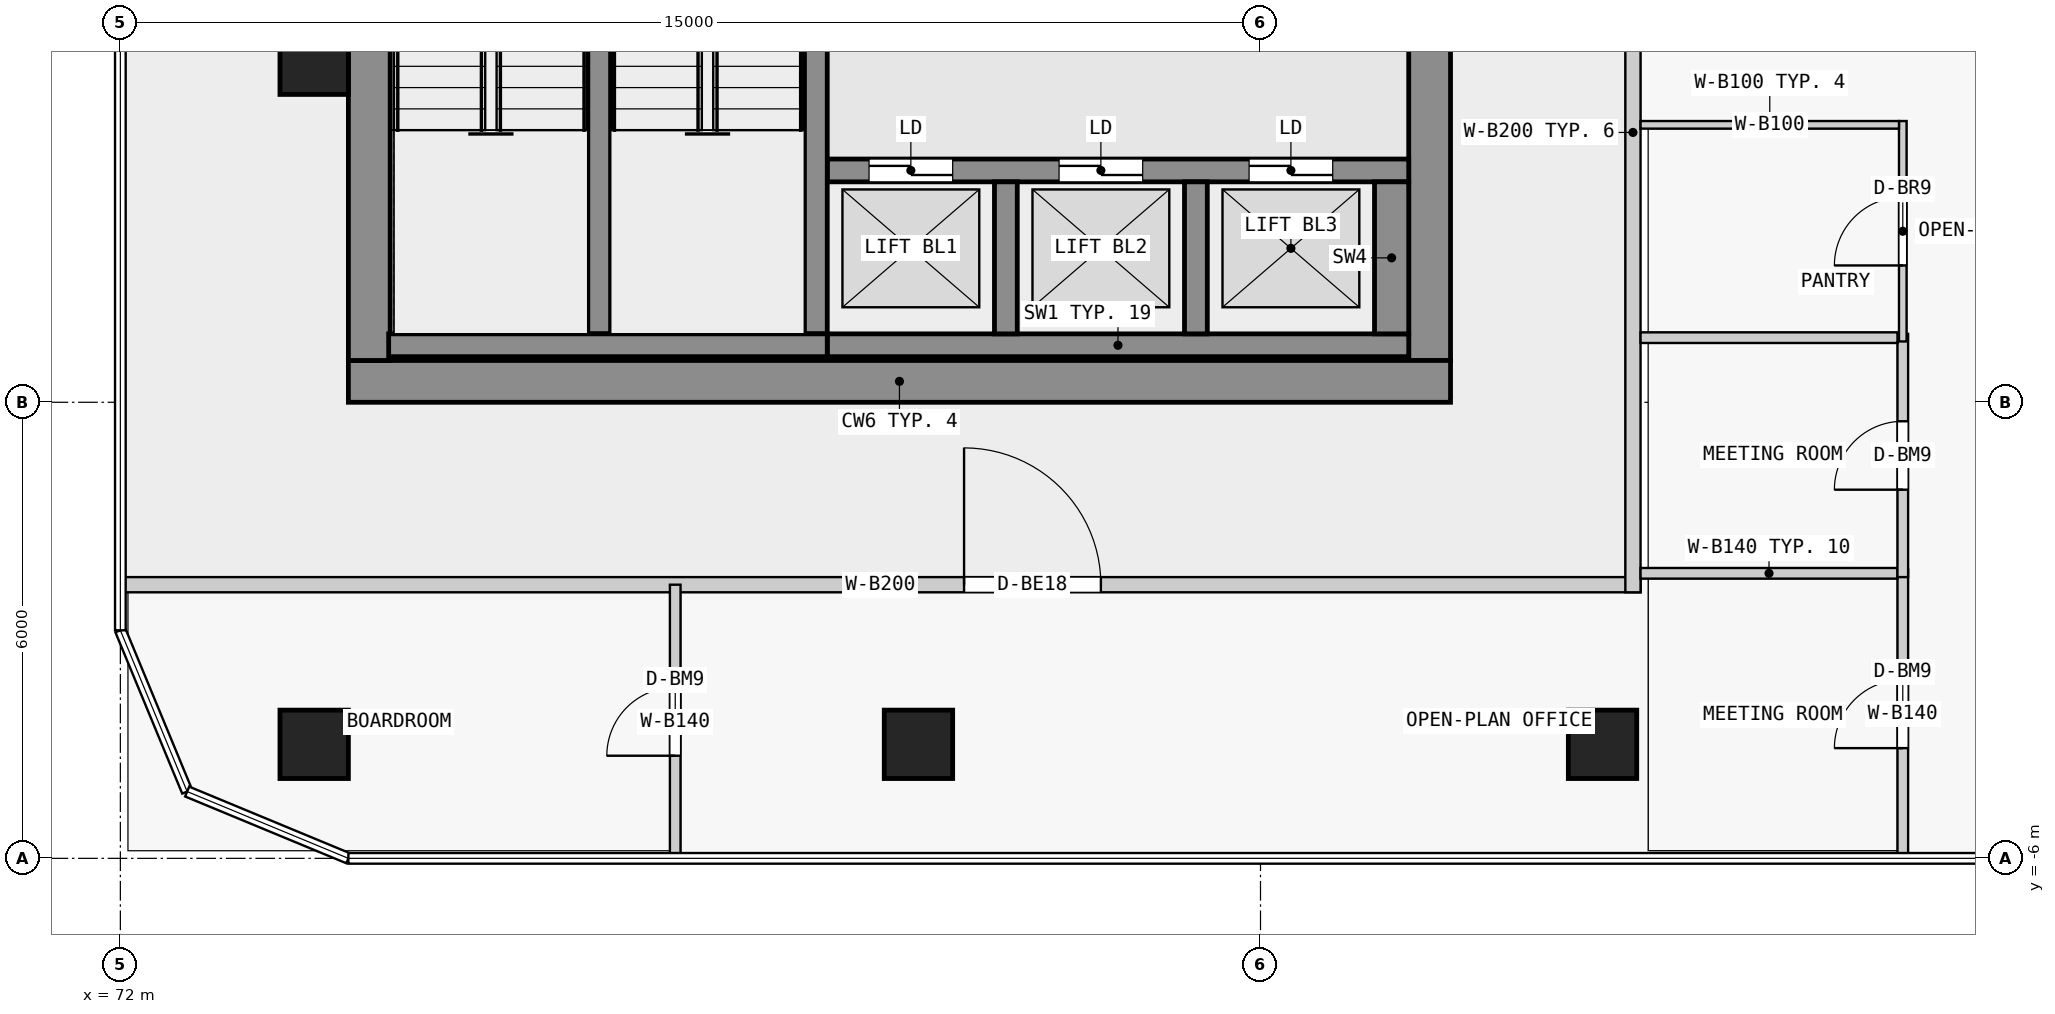
"""IFC4 building model, lengths in metres.
Left out: names, types, materials, properties, quantities, classifications, styles, units other than length and angle.
Written with IfcOpenShell. Run it as: python <this file> out.ifc"""

import sys

from ifc_helpers import new_model, si_unit, direction, frame, frame_2d, origin, origin_2d, place, context, subcontext, project, spatial, rectangle, extrude, element, fill, save


model = new_model("IFC4")
c1 = context("Model", 3, precision=1e-05, world=origin(), true_north=direction((0.0, 1.0)))
c2 = subcontext(c1, "Body", "Model", "MODEL_VIEW")
j1 = project(units=[si_unit("LENGTHUNIT", "METRE"), si_unit("PLANEANGLEUNIT", "RADIAN")], contexts=[c1])
p1 = place(None, origin())
s1 = spatial("IfcSite", under=j1, at=p1, CompositionType="ELEMENT")
p2 = place(p1, origin())
s2 = spatial("IfcBuilding", under=s1, at=p2, CompositionType="ELEMENT")
p3 = place(p2, frame((0.0, 0.0, 33.8)))
s3 = spatial("IfcBuildingStorey", under=s2, at=p3, CompositionType="ELEMENT", Elevation=33.8)
for number, where, z_axis, x_axis in (
    (1, (74.55, -4.5, 0.0), (0.0, 0.0, 1.0), (1.0, 0.0, 0.0)),
    (2, (82.5, -4.5, 0.0), (0.0, 0.0, 1.0), (1.0, 0.0, 0.0)),
    (3, (91.5, -4.5, 0.0), (0.0, 0.0, 1.0), (1.0, 0.0, 0.0)),
    (4, (74.55, 4.5, 0.0), (0.0, 0.0, 1.0), (1.0, 0.0, 0.0)),
):
    element("IfcColumn", number, at=place(p3, frame(where, z_axis=z_axis, x_axis=x_axis)), inside=s3, PredefinedType="COLUMN", context=c2, shape_type="SweptSolid", body=[
        extrude(rectangle(XDim=0.9, YDim=0.9, at=origin_2d()), origin(), (0.0, 0.0, 1.0), 3.5),
    ])
p4 = place(p3, frame((75.0, 0.275, 0.0), z_axis=(0.0, 0.0, 1.0), x_axis=(1.0, 0.0, 0.0)))
e5 = element("IfcWall", 5, at=p4, inside=s3, PredefinedType="SHEAR", context=c2, shape_type="SweptSolid", body=[
    extrude(rectangle(XDim=14.5, YDim=0.55, at=frame_2d((7.25, 0.0))), origin(), (0.0, 0.0, 1.0), 3.25),
])
p5 = place(p3, frame((75.275, 0.55, 0.0), z_axis=(0.0, 0.0, 1.0), x_axis=(0.0, 1.0, 0.0)))
e6 = element("IfcWall", 6, at=p5, inside=s3, PredefinedType="SHEAR", context=c2, shape_type="SweptSolid", body=[
    extrude(rectangle(XDim=16.9, YDim=0.55, at=frame_2d((8.45, 0.0))), origin(), (0.0, 0.0, 1.0), 3.25),
])
p6 = place(p5, frame((7.825, 0.0, 0.0)))
e7 = element("IfcOpeningElement", 7, at=p6, cuts=e6, PredefinedType="OPENING", context=c2, shape_type="SweptSolid", body=[
    extrude(rectangle(XDim=1.8, YDim=2.1, at=frame_2d((0.9, 1.05))), frame((0.0, 0.285, 0.0), z_axis=(0.0, -1.0, 0.0), x_axis=(1.0, 0.0, 0.0)), (0.0, 0.0, 1.0), 0.57),
])
p7 = place(p3, frame((89.225, 0.55, 0.0), z_axis=(0.0, 0.0, 1.0), x_axis=(0.0, 1.0, 0.0)))
e8 = element("IfcWall", 8, at=p7, inside=s3, PredefinedType="SHEAR", context=c2, shape_type="SweptSolid", body=[
    extrude(rectangle(XDim=16.9, YDim=0.55, at=frame_2d((8.45, 0.0))), origin(), (0.0, 0.0, 1.0), 3.25),
])
p8 = place(p7, frame((7.55, 0.0, 0.0)))
e9 = element("IfcOpeningElement", 9, at=p8, cuts=e8, PredefinedType="OPENING", context=c2, shape_type="SweptSolid", body=[
    extrude(rectangle(XDim=1.8, YDim=2.1, at=frame_2d((0.9, 1.05))), frame((0.0, 0.285, 0.0), z_axis=(0.0, -1.0, 0.0), x_axis=(1.0, 0.0, 0.0)), (0.0, 0.0, 1.0), 0.57),
])
p9 = place(p3, frame((75.53, 0.75, 0.0), z_axis=(0.0, 0.0, 1.0), x_axis=(1.0, 0.0, 0.0)))
e10 = element("IfcWall", 10, at=p9, inside=s3, PredefinedType="SHEAR", context=c2, shape_type="SweptSolid", body=[
    extrude(rectangle(XDim=5.77, YDim=0.3, at=frame_2d((2.885, 0.0))), origin(), (0.0, 0.0, 1.0), 3.25),
])
for number, where, z_axis, x_axis in (
    (11, (78.3, 0.9, 0.0), (0.0, 0.0, 1.0), (0.0, 1.0, 0.0)),
    (12, (81.15, 0.9, 0.0), (0.0, 0.0, 1.0), (0.0, 1.0, 0.0)),
):
    element("IfcWall", number, at=place(p3, frame(where, z_axis=z_axis, x_axis=x_axis)), inside=s3, PredefinedType="SHEAR", context=c2, shape_type="SweptSolid", body=[
        extrude(rectangle(XDim=6.4, YDim=0.3, at=frame_2d((3.2, 0.0))), origin(), (0.0, 0.0, 1.0), 3.25),
    ])
p10 = place(p3, frame((81.3, 0.75, 0.0), z_axis=(0.0, 0.0, 1.0), x_axis=(1.0, 0.0, 0.0)))
e13 = element("IfcWall", 13, at=p10, inside=s3, PredefinedType="SHEAR", context=c2, shape_type="SweptSolid", body=[
    extrude(rectangle(XDim=7.65, YDim=0.3, at=frame_2d((3.825, 0.0))), origin(), (0.0, 0.0, 1.0), 3.25),
])
for number, where, z_axis, x_axis in (
    (14, (83.65, 0.9, 0.0), (0.0, 0.0, 1.0), (0.0, 1.0, 0.0)),
    (15, (86.15, 0.9, 0.0), (0.0, 0.0, 1.0), (0.0, 1.0, 0.0)),
):
    element("IfcWall", number, at=place(p3, frame(where, z_axis=z_axis, x_axis=x_axis)), inside=s3, PredefinedType="SHEAR", context=c2, shape_type="SweptSolid", body=[
        extrude(rectangle(XDim=2.0, YDim=0.3, at=frame_2d((1.0, 0.0))), origin(), (0.0, 0.0, 1.0), 3.25),
    ])
p11 = place(p3, frame((88.725, 0.9, 0.0), z_axis=(0.0, 0.0, 1.0), x_axis=(0.0, 1.0, 0.0)))
e16 = element("IfcWall", 16, at=p11, inside=s3, PredefinedType="SHEAR", context=c2, shape_type="SweptSolid", body=[
    extrude(rectangle(XDim=2.0, YDim=0.45, at=frame_2d((1.0, 0.0))), origin(), (0.0, 0.0, 1.0), 3.25),
])
p12 = place(p3, frame((81.3, 3.05, 0.0), z_axis=(0.0, 0.0, 1.0), x_axis=(1.0, 0.0, 0.0)))
e17 = element("IfcWall", 17, at=p12, inside=s3, PredefinedType="SHEAR", context=c2, shape_type="SweptSolid", body=[
    extrude(rectangle(XDim=7.65, YDim=0.3, at=frame_2d((3.825, 0.0))), origin(), (0.0, 0.0, 1.0), 3.25),
])
p13 = place(p12, frame((0.55, 0.0, 0.0)))
e18 = element("IfcOpeningElement", 18, at=p13, cuts=e17, PredefinedType="OPENING", context=c2, shape_type="SweptSolid", body=[
    extrude(rectangle(XDim=1.1, YDim=2.1, at=frame_2d((0.55, 1.05))), frame((0.0, 0.16, 0.0), z_axis=(0.0, -1.0, 0.0), x_axis=(1.0, 0.0, 0.0)), (0.0, 0.0, 1.0), 0.32),
])
p14 = place(p12, frame((3.05, 0.0, 0.0)))
e19 = element("IfcOpeningElement", 19, at=p14, cuts=e17, PredefinedType="OPENING", context=c2, shape_type="SweptSolid", body=[
    extrude(rectangle(XDim=1.1, YDim=2.1, at=frame_2d((0.55, 1.05))), frame((0.0, 0.16, 0.0), z_axis=(0.0, -1.0, 0.0), x_axis=(1.0, 0.0, 0.0)), (0.0, 0.0, 1.0), 0.32),
])
p15 = place(p12, frame((5.55, 0.0, 0.0)))
e20 = element("IfcOpeningElement", 20, at=p15, cuts=e17, PredefinedType="OPENING", context=c2, shape_type="SweptSolid", body=[
    extrude(rectangle(XDim=1.1, YDim=2.1, at=frame_2d((0.55, 1.05))), frame((0.0, 0.16, 0.0), z_axis=(0.0, -1.0, 0.0), x_axis=(1.0, 0.0, 0.0)), (0.0, 0.0, 1.0), 0.32),
])
p16 = place(p3, frame((72.0, -2.4, 0.0), z_axis=(0.0, 0.0, 1.0), x_axis=(1.0, 0.0, 0.0)))
e21 = element("IfcWall", 21, at=p16, inside=s3, PredefinedType="PARTITIONING", context=c2, shape_type="SweptSolid", body=[
    extrude(rectangle(XDim=20.0, YDim=0.2, at=frame_2d((10.0, 0.0))), origin(), (0.0, 0.0, 1.0), 3.25),
])
p17 = place(p16, frame((11.1, 0.0, 0.0)))
e22 = element("IfcOpeningElement", 22, at=p17, cuts=e21, PredefinedType="OPENING", context=c2, shape_type="SweptSolid", body=[
    extrude(rectangle(XDim=1.8, YDim=2.1, at=frame_2d((0.9, 1.05))), frame((0.0, 0.11, 0.0), z_axis=(0.0, -1.0, 0.0), x_axis=(1.0, 0.0, 0.0)), (0.0, 0.0, 1.0), 0.22),
])
p18 = place(p3, frame((91.9, -2.5, 0.0), z_axis=(0.0, 0.0, 1.0), x_axis=(0.0, 1.0, 0.0)))
e23 = element("IfcWall", 23, at=p18, inside=s3, PredefinedType="PARTITIONING", context=c2, shape_type="SweptSolid", body=[
    extrude(rectangle(XDim=12.1, YDim=0.2, at=frame_2d((6.05, 0.0))), origin(), (0.0, 0.0, 1.0), 3.25),
])
p19 = place(p3, frame((79.3, -6.0, 0.0), z_axis=(0.0, 0.0, 1.0), x_axis=(0.0, 1.0, 0.0)))
e24 = element("IfcWall", 24, at=p19, inside=s3, PredefinedType="PARTITIONING", context=c2, shape_type="SweptSolid", body=[
    extrude(rectangle(XDim=3.6, YDim=0.14, at=frame_2d((1.8, 0.0))), origin(), (0.0, 0.0, 1.0), 3.25),
])
p20 = place(p19, frame((1.35, 0.0, 0.0)))
e25 = element("IfcOpeningElement", 25, at=p20, cuts=e24, PredefinedType="OPENING", context=c2, shape_type="SweptSolid", body=[
    extrude(rectangle(XDim=0.9, YDim=2.4, at=frame_2d((0.45, 1.2))), frame((0.0, 0.08, 0.0), z_axis=(0.0, -1.0, 0.0), x_axis=(1.0, 0.0, 0.0)), (0.0, 0.0, 1.0), 0.16),
])
p21 = place(p3, frame((95.45, -6.0, 0.0), z_axis=(0.0, 0.0, 1.0), x_axis=(0.0, 1.0, 0.0)))
e26 = element("IfcWall", 26, at=p21, inside=s3, PredefinedType="PARTITIONING", context=c2, shape_type="SweptSolid", body=[
    extrude(rectangle(XDim=3.8, YDim=0.14, at=frame_2d((1.9, 0.0))), origin(), (0.0, 0.0, 1.0), 3.25),
])
p22 = place(p21, frame((1.45, 0.0, 0.0)))
e27 = element("IfcOpeningElement", 27, at=p22, cuts=e26, PredefinedType="OPENING", context=c2, shape_type="SweptSolid", body=[
    extrude(rectangle(XDim=0.9, YDim=2.4, at=frame_2d((0.45, 1.2))), frame((0.0, 0.08, 0.0), z_axis=(0.0, -1.0, 0.0), x_axis=(1.0, 0.0, 0.0)), (0.0, 0.0, 1.0), 0.16),
])
p23 = place(p3, frame((92.0, -2.25, 0.0), z_axis=(0.0, 0.0, 1.0), x_axis=(1.0, 0.0, 0.0)))
e28 = element("IfcWall", 28, at=p23, inside=s3, PredefinedType="PARTITIONING", context=c2, shape_type="SweptSolid", body=[
    extrude(rectangle(XDim=3.38, YDim=0.14, at=frame_2d((1.69, 0.0))), origin(), (0.0, 0.0, 1.0), 3.25),
])
p24 = place(p3, frame((95.45, -2.3, 0.0), z_axis=(0.0, 0.0, 1.0), x_axis=(0.0, 1.0, 0.0)))
e29 = element("IfcWall", 29, at=p24, inside=s3, PredefinedType="PARTITIONING", context=c2, shape_type="SweptSolid", body=[
    extrude(rectangle(XDim=3.2, YDim=0.14, at=frame_2d((1.6, 0.0))), origin(), (0.0, 0.0, 1.0), 3.25),
])
p25 = place(p24, frame((1.15, 0.0, 0.0)))
e30 = element("IfcOpeningElement", 30, at=p25, cuts=e29, PredefinedType="OPENING", context=c2, shape_type="SweptSolid", body=[
    extrude(rectangle(XDim=0.9, YDim=2.4, at=frame_2d((0.45, 1.2))), frame((0.0, 0.08, 0.0), z_axis=(0.0, -1.0, 0.0), x_axis=(1.0, 0.0, 0.0)), (0.0, 0.0, 1.0), 0.16),
])
p26 = place(p3, frame((92.0, 0.85, 0.0), z_axis=(0.0, 0.0, 1.0), x_axis=(1.0, 0.0, 0.0)))
e31 = element("IfcWall", 31, at=p26, inside=s3, PredefinedType="PARTITIONING", context=c2, shape_type="SweptSolid", body=[
    extrude(rectangle(XDim=3.38, YDim=0.14, at=frame_2d((1.69, 0.0))), origin(), (0.0, 0.0, 1.0), 3.25),
])
p27 = place(p3, frame((95.45, 0.8, 0.0), z_axis=(0.0, 0.0, 1.0), x_axis=(0.0, 1.0, 0.0)))
e32 = element("IfcWall", 32, at=p27, inside=s3, PredefinedType="PARTITIONING", context=c2, shape_type="SweptSolid", body=[
    extrude(rectangle(XDim=2.9, YDim=0.1, at=frame_2d((1.45, 0.0))), origin(), (0.0, 0.0, 1.0), 3.25),
])
p28 = place(p27, frame((1.0, 0.0, 0.0)))
e33 = element("IfcOpeningElement", 33, at=p28, cuts=e32, PredefinedType="OPENING", context=c2, shape_type="SweptSolid", body=[
    extrude(rectangle(XDim=0.9, YDim=2.1, at=frame_2d((0.45, 1.05))), frame((0.0, 0.06, 0.0), z_axis=(0.0, -1.0, 0.0), x_axis=(1.0, 0.0, 0.0)), (0.0, 0.0, 1.0), 0.12),
])
p29 = place(p3, frame((92.0, 3.65, 0.0), z_axis=(0.0, 0.0, 1.0), x_axis=(1.0, 0.0, 0.0)))
e34 = element("IfcWall", 34, at=p29, inside=s3, PredefinedType="PARTITIONING", context=c2, shape_type="SweptSolid", body=[
    extrude(rectangle(XDim=3.4, YDim=0.1, at=frame_2d((1.7, 0.0))), origin(), (0.0, 0.0, 1.0), 3.25),
])
p30 = place(p13, origin())
e35 = element("IfcDoor", 35, at=p30, inside=s3, OperationType="DOUBLE_DOOR_SLIDING", PredefinedType="DOOR", context=c2, shape_type="SweptSolid", body=[
    extrude(rectangle(XDim=1.1, YDim=2.1, at=frame_2d((0.55, 1.05))), frame((0.0, 0.025, 0.0), z_axis=(0.0, -1.0, 0.0), x_axis=(1.0, 0.0, 0.0)), (0.0, 0.0, 1.0), 0.05),
])
fill(e18, e35)
p31 = place(p14, origin())
e36 = element("IfcDoor", 36, at=p31, inside=s3, OperationType="DOUBLE_DOOR_SLIDING", PredefinedType="DOOR", context=c2, shape_type="SweptSolid", body=[
    extrude(rectangle(XDim=1.1, YDim=2.1, at=frame_2d((0.55, 1.05))), frame((0.0, 0.025, 0.0), z_axis=(0.0, -1.0, 0.0), x_axis=(1.0, 0.0, 0.0)), (0.0, 0.0, 1.0), 0.05),
])
fill(e19, e36)
p32 = place(p15, origin())
e37 = element("IfcDoor", 37, at=p32, inside=s3, OperationType="DOUBLE_DOOR_SLIDING", PredefinedType="DOOR", context=c2, shape_type="SweptSolid", body=[
    extrude(rectangle(XDim=1.1, YDim=2.1, at=frame_2d((0.55, 1.05))), frame((0.0, 0.025, 0.0), z_axis=(0.0, -1.0, 0.0), x_axis=(1.0, 0.0, 0.0)), (0.0, 0.0, 1.0), 0.05),
])
fill(e20, e37)
p33 = place(p17, origin())
e38 = element("IfcDoor", 38, at=p33, inside=s3, OperationType="DOUBLE_DOOR_SINGLE_SWING", PredefinedType="DOOR", context=c2, shape_type="SweptSolid", body=[
    extrude(rectangle(XDim=1.8, YDim=2.1, at=frame_2d((0.9, 1.05))), frame((0.0, 0.025, 0.0), z_axis=(0.0, -1.0, 0.0), x_axis=(1.0, 0.0, 0.0)), (0.0, 0.0, 1.0), 0.05),
])
fill(e22, e38)
p34 = place(p20, origin())
e39 = element("IfcDoor", 39, at=p34, inside=s3, OperationType="SINGLE_SWING_LEFT", PredefinedType="DOOR", context=c2, shape_type="SweptSolid", body=[
    extrude(rectangle(XDim=0.9, YDim=2.4, at=frame_2d((0.45, 1.2))), frame((0.0, 0.025, 0.0), z_axis=(0.0, -1.0, 0.0), x_axis=(1.0, 0.0, 0.0)), (0.0, 0.0, 1.0), 0.05),
])
fill(e25, e39)
p35 = place(p22, origin())
e40 = element("IfcDoor", 40, at=p35, inside=s3, OperationType="SINGLE_SWING_LEFT", PredefinedType="DOOR", context=c2, shape_type="SweptSolid", body=[
    extrude(rectangle(XDim=0.9, YDim=2.4, at=frame_2d((0.45, 1.2))), frame((0.0, 0.025, 0.0), z_axis=(0.0, -1.0, 0.0), x_axis=(1.0, 0.0, 0.0)), (0.0, 0.0, 1.0), 0.05),
])
fill(e27, e40)
p36 = place(p25, origin())
e41 = element("IfcDoor", 41, at=p36, inside=s3, OperationType="SINGLE_SWING_LEFT", PredefinedType="DOOR", context=c2, shape_type="SweptSolid", body=[
    extrude(rectangle(XDim=0.9, YDim=2.4, at=frame_2d((0.45, 1.2))), frame((0.0, 0.025, 0.0), z_axis=(0.0, -1.0, 0.0), x_axis=(1.0, 0.0, 0.0)), (0.0, 0.0, 1.0), 0.05),
])
fill(e30, e41)
p37 = place(p28, origin())
e42 = element("IfcDoor", 42, at=p37, inside=s3, OperationType="SINGLE_SWING_LEFT", PredefinedType="DOOR", context=c2, shape_type="SweptSolid", body=[
    extrude(rectangle(XDim=0.9, YDim=2.1, at=frame_2d((0.45, 1.05))), frame((0.0, 0.025, 0.0), z_axis=(0.0, -1.0, 0.0), x_axis=(1.0, 0.0, 0.0)), (0.0, 0.0, 1.0), 0.05),
])
fill(e33, e42)
save(model, sys.argv[1])
